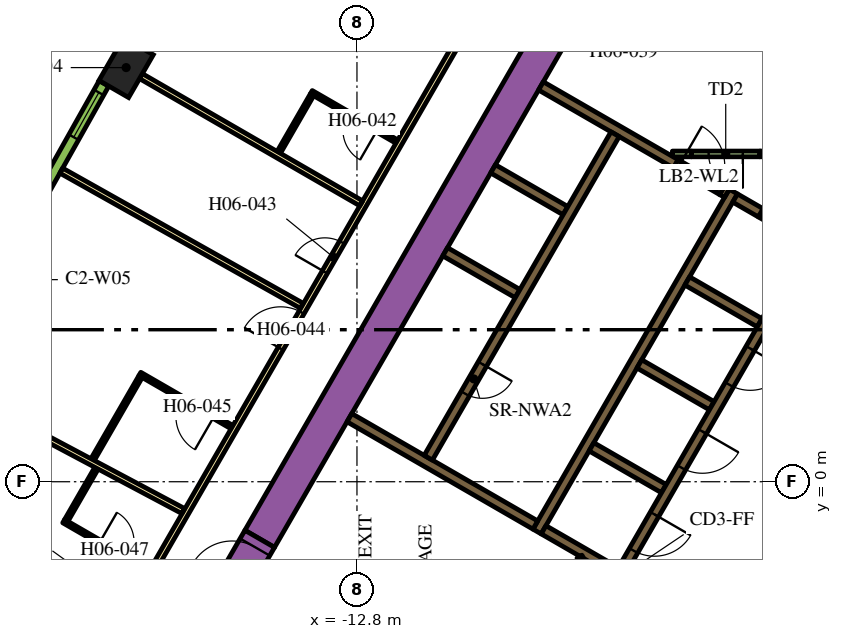
"""IFC4 building model, lengths in metres.
Left out: names, types, materials, properties, quantities, classifications, styles, units other than length and angle.
Written with IfcOpenShell. Run it as: python <this file> out.ifc"""

import sys

from ifc_helpers import new_model, si_unit, direction, frame, frame_2d, origin, origin_2d, place, context, subcontext, project, spatial, polyline, rectangle, outline, extrude, element, fill, save


model = new_model("IFC4")
c1 = context("Model", 3, precision=1e-05, world=origin(), true_north=direction((0.0, 1.0)))
c2 = subcontext(c1, "Body", "Model", "MODEL_VIEW")
j1 = project(units=[si_unit("LENGTHUNIT", "METRE"), si_unit("PLANEANGLEUNIT", "RADIAN")], contexts=[c1])
p1 = place(None, origin())
s1 = spatial("IfcSite", under=j1, at=p1, CompositionType="ELEMENT")
p2 = place(p1, origin())
s2 = spatial("IfcBuilding", under=s1, at=p2, CompositionType="ELEMENT")
p3 = place(p2, frame((0.0, 0.0, 87.6)))
s3 = spatial("IfcBuildingStorey", under=s2, at=p3, CompositionType="ELEMENT", Elevation=87.6)
p4 = place(p3, frame((-18.874, 10.897, 0.0), z_axis=(0.0, 0.0, 1.0), x_axis=(-0.5, -0.866025403784, 0.0)))
e1 = element("IfcColumn", 1, at=p4, inside=s3, PredefinedType="COLUMN", context=c2, shape_type="SweptSolid", body=[
    extrude(rectangle(XDim=1.3, YDim=0.9, at=origin_2d()), origin(), (0.0, 0.0, 1.0), 3.9),
])
p5 = place(p3, frame((-15.36, -1.503, 0.0), z_axis=(0.0, 0.0, 1.0), x_axis=(0.50000389221, 0.866023156604, 0.0)))
e2 = element("IfcWall", 2, at=p5, inside=s3, PredefinedType="SOLIDWALL", context=c2, shape_type="SweptSolid", body=[
    extrude(rectangle(XDim=21.0, YDim=0.9, at=frame_2d((10.5, 0.0))), origin(), (0.0, 0.0, 1.0), 3.9),
])
p6 = place(p3, frame((-8.06, -1.311, 0.0), z_axis=(0.0, 0.0, 1.0), x_axis=(0.50000273126, 0.866023826885, 0.0)))
e3 = element("IfcWall", 3, at=p6, inside=s3, PredefinedType="SOLIDWALL", context=c2, shape_type="SweptSolid", body=[
    extrude(rectangle(XDim=10.33, YDim=0.25, at=frame_2d((5.165, 0.0))), origin(), (0.0, 0.0, 1.0), 3.9),
])
p7 = place(p3, frame((-1.819, 6.87, 0.0), z_axis=(0.0, 0.0, 1.0), x_axis=(-0.866294599386, 0.499533449405, 0.0)))
e4 = element("IfcWall", 4, at=p7, inside=s3, PredefinedType="SOLIDWALL", context=c2, shape_type="SweptSolid", body=[
    extrude(rectangle(XDim=0.41, YDim=0.25, at=frame_2d((0.205, 0.0))), origin(), (0.0, 0.0, 1.0), 3.9),
])
p8 = place(p3, frame((-2.849, 7.465, 0.0), z_axis=(0.0, 0.0, 1.0), x_axis=(0.865955664968, -0.500120771724, 0.0)))
e5 = element("IfcWall", 5, at=p8, inside=s3, PredefinedType="SOLIDWALL", context=c2, shape_type="SweptSolid", body=[
    extrude(rectangle(XDim=0.778, YDim=0.25, at=frame_2d((0.389, 0.0))), origin(), (0.0, 0.0, 1.0), 3.9),
])
for number, where, z_axis, x_axis in (
    (6, (-2.204, 4.182, 0.0), (0.0, 0.0, 1.0), (-0.866, 0.5, 0.0)),
    (7, (-5.369, 3.1, 0.0), (0.0, 0.0, 1.0), (0.866, -0.5, 0.0)),
    (8, (-4.724, -0.182, 0.0), (0.0, 0.0, 1.0), (-0.866, 0.5, 0.0)),
):
    element("IfcWall", number, at=place(p3, frame(where, z_axis=z_axis, x_axis=x_axis)), inside=s3, PredefinedType="SOLIDWALL", context=c2, shape_type="SweptSolid", body=[
        extrude(rectangle(XDim=2.2, YDim=0.25, at=frame_2d((1.1, 0.0))), origin(), (0.0, 0.0, 1.0), 3.9),
    ])
p9 = place(p3, origin())
e9 = element("IfcWall", 9, at=p9, inside=s3, PredefinedType="SOLIDWALL", context=c2, shape_type="SweptSolid", body=[
    extrude(outline(polyline([(-5.922, -2.257), (-5.922, -2.257), (-5.705, -2.382), (-5.83, -2.598), (-6.829, -2.021), (-6.88, -1.934), (-6.88, -1.934), (-6.93, -1.963), (-7.952, -1.373), (-7.827, -1.156), (-5.922, -2.257)])), origin(), (0.0, 0.0, 1.0), 3.9),
])
p10 = place(p3, frame((-8.106, -1.14, 0.0), z_axis=(0.0, 0.0, 1.0), x_axis=(-0.866000643155, 0.500042884217, 0.0)))
e10 = element("IfcWall", 10, at=p10, inside=s3, PredefinedType="SOLIDWALL", context=c2, shape_type="SweptSolid", body=[
    extrude(rectangle(XDim=5.65, YDim=0.25, at=frame_2d((2.825, 0.0))), origin(), (0.0, 0.0, 1.0), 3.9),
])
e11 = element("IfcWall", 11, at=p9, inside=s3, PredefinedType="SOLIDWALL", context=c2, shape_type="SweptSolid", body=[
    extrude(outline(polyline([(-3.128, 7.481), (-3.259, 7.557), (-3.134, 7.773), (-3.003, 7.698), (-3.128, 7.481)])), origin(), (0.0, 0.0, 1.0), 3.9),
])
for number, where, z_axis, x_axis in (
    (12, (-8.574, 4.95, 0.0), (0.0, 0.0, 1.0), (-0.866, 0.5, 0.0)),
    (13, (-7.314, 7.132, 0.0), (0.0, 0.0, 1.0), (-0.866, 0.5, 0.0)),
):
    element("IfcWall", number, at=place(p3, frame(where, z_axis=z_axis, x_axis=x_axis)), inside=s3, PredefinedType="SOLIDWALL", context=c2, shape_type="SweptSolid", body=[
        extrude(rectangle(XDim=2.2, YDim=0.25, at=frame_2d((1.1, 0.0))), origin(), (0.0, 0.0, 1.0), 3.9),
    ])
p11 = place(p3, frame((-7.959, 10.415, 0.0), z_axis=(0.0, 0.0, 1.0), x_axis=(0.866020958405, -0.500007699544, 0.0)))
e14 = element("IfcWall", 14, at=p11, inside=s3, PredefinedType="SOLIDWALL", context=c2, shape_type="SweptSolid", body=[
    extrude(rectangle(XDim=4.1, YDim=0.25, at=frame_2d((2.05, 0.0))), origin(), (0.0, 0.0, 1.0), 3.9),
])
p12 = place(p3, frame((-3.997, 8.625, 0.0), z_axis=(0.0, 0.0, 1.0), x_axis=(-1.0, 0.0, 0.0)))
e15 = element("IfcWall", 15, at=p12, inside=s3, PredefinedType="PARTITIONING", context=c2, shape_type="SweptSolid", body=[
    extrude(rectangle(XDim=0.502, YDim=0.15, at=frame_2d((0.251, 0.0))), origin(), (0.0, 0.0, 1.0), 2.75),
])
p13 = place(p3, frame((-2.196, 8.625, 0.0), z_axis=(0.0, 0.0, 1.0), x_axis=(1.0, 0.0, 0.0)))
e16 = element("IfcWall", 16, at=p13, inside=s3, PredefinedType="PARTITIONING", context=c2, shape_type="SweptSolid", body=[
    extrude(rectangle(XDim=1.146, YDim=0.15, at=frame_2d((0.573, 0.0))), origin(), (0.0, 0.0, 1.0), 2.75),
])
p14 = place(p3, frame((-6.008, 9.144, 0.0), z_axis=(0.0, 0.0, 1.0), x_axis=(-0.500006956611, -0.866021387346, 0.0)))
e17 = element("IfcWall", 17, at=p14, inside=s3, PredefinedType="SOLIDWALL", context=c2, shape_type="SweptSolid", body=[
    extrude(rectangle(XDim=9.83, YDim=0.25, at=frame_2d((4.915, 0.0))), origin(), (0.0, 0.0, 1.0), 3.9),
])
p15 = place(p14, frame((6.985, 0.0, 0.0)))
e18 = element("IfcOpeningElement", 18, at=p15, cuts=e17, PredefinedType="OPENING", context=c2, shape_type="SweptSolid", body=[
    extrude(rectangle(XDim=0.9, YDim=2.1, at=frame_2d((0.45, 1.05))), frame((0.0, 0.135, 0.0), z_axis=(0.0, -1.0, 0.0), x_axis=(1.0, 0.0, 0.0)), (0.0, 0.0, 1.0), 0.27),
])
p16 = place(p3, frame((-0.898, 6.194, 0.0), z_axis=(0.0, 0.0, 1.0), x_axis=(-0.499996202215, -0.866027596426, 0.0)))
e19 = element("IfcWall", 19, at=p16, inside=s3, PredefinedType="SOLIDWALL", context=c2, shape_type="SweptSolid", body=[
    extrude(rectangle(XDim=9.83, YDim=0.25, at=frame_2d((4.915, 0.0))), origin(), (0.0, 0.0, 1.0), 3.9),
])
p17 = place(p16, frame((0.585, 0.0, 0.0)))
e20 = element("IfcOpeningElement", 20, at=p17, cuts=e19, PredefinedType="OPENING", context=c2, shape_type="SweptSolid", body=[
    extrude(rectangle(XDim=1.1, YDim=2.1, at=frame_2d((0.55, 1.05))), frame((0.0, 0.135, 0.0), z_axis=(0.0, -1.0, 0.0), x_axis=(1.0, 0.0, 0.0)), (0.0, 0.0, 1.0), 0.27),
])
p18 = place(p16, frame((3.105, 0.0, 0.0)))
e21 = element("IfcOpeningElement", 21, at=p18, cuts=e19, PredefinedType="OPENING", context=c2, shape_type="SweptSolid", body=[
    extrude(rectangle(XDim=1.1, YDim=2.1, at=frame_2d((0.55, 1.05))), frame((0.0, 0.135, 0.0), z_axis=(0.0, -1.0, 0.0), x_axis=(1.0, 0.0, 0.0)), (0.0, 0.0, 1.0), 0.27),
])
p19 = place(p16, frame((5.625, 0.0, 0.0)))
e22 = element("IfcOpeningElement", 22, at=p19, cuts=e19, PredefinedType="OPENING", context=c2, shape_type="SweptSolid", body=[
    extrude(rectangle(XDim=1.1, YDim=2.1, at=frame_2d((0.55, 1.05))), frame((0.0, 0.135, 0.0), z_axis=(0.0, -1.0, 0.0), x_axis=(1.0, 0.0, 0.0)), (0.0, 0.0, 1.0), 0.27),
])
p20 = place(p16, frame((8.145, 0.0, 0.0)))
e23 = element("IfcOpeningElement", 23, at=p20, cuts=e19, PredefinedType="OPENING", context=c2, shape_type="SweptSolid", body=[
    extrude(rectangle(XDim=1.1, YDim=2.1, at=frame_2d((0.55, 1.05))), frame((0.0, 0.135, 0.0), z_axis=(0.0, -1.0, 0.0), x_axis=(1.0, 0.0, 0.0)), (0.0, 0.0, 1.0), 0.27),
])
p21 = place(p3, frame((-2.196, 8.625, 0.0), z_axis=(0.0, 0.0, 1.0), x_axis=(-1.0, 0.0, 0.0)))
e24 = element("IfcWall", 24, at=p21, inside=s3, PredefinedType="PARTITIONING", context=c2, shape_type="SweptSolid", body=[
    extrude(rectangle(XDim=1.8, YDim=0.15, at=frame_2d((0.9, 0.0))), origin(), (0.0, 0.0, 1.0), 2.75),
])
p22 = place(p21, frame((0.45, 0.0, 0.0)))
e25 = element("IfcOpeningElement", 25, at=p22, cuts=e24, PredefinedType="OPENING", context=c2, shape_type="SweptSolid", body=[
    extrude(rectangle(XDim=0.9, YDim=2.1, at=frame_2d((0.45, 1.05))), frame((0.0, 0.085, 0.0), z_axis=(0.0, -1.0, 0.0), x_axis=(1.0, 0.0, 0.0)), (0.0, 0.0, 1.0), 0.17),
])
p23 = place(p3, frame((-5.895, -3.79, 0.0), z_axis=(0.0, 0.0, 1.0), x_axis=(-0.49994051562, 0.866059744384, 0.0)))
e26 = element("IfcWall", 26, at=p23, inside=s3, PredefinedType="PARTITIONING", context=c2, shape_type="SweptSolid", body=[
    extrude(rectangle(XDim=2.1, YDim=0.15, at=frame_2d((1.05, 0.0))), origin(), (0.0, 0.0, 1.0), 2.75),
])
p24 = place(p23, frame((0.45, 0.0, 0.0)))
e27 = element("IfcOpeningElement", 27, at=p24, cuts=e26, PredefinedType="OPENING", context=c2, shape_type="SweptSolid", body=[
    extrude(rectangle(XDim=1.2, YDim=2.1, at=frame_2d((0.6, 1.05))), frame((0.0, 0.085, 0.0), z_axis=(0.0, -1.0, 0.0), x_axis=(1.0, 0.0, 0.0)), (0.0, 0.0, 1.0), 0.17),
])
p25 = place(p3, frame((-4.409, 8.365, 0.0), z_axis=(0.0, 0.0, 1.0), x_axis=(0.866034573852, -0.49998411664, 0.0)))
e28 = element("IfcWall", 28, at=p25, inside=s3, PredefinedType="SOLIDWALL", context=c2, shape_type="SweptSolid", body=[
    extrude(rectangle(XDim=1.4, YDim=0.25, at=frame_2d((0.7, 0.0))), origin(), (0.0, 0.0, 1.0), 3.9),
])
p26 = place(p25, frame((0.1, 0.0, 0.0)))
e29 = element("IfcOpeningElement", 29, at=p26, cuts=e28, PredefinedType="OPENING", context=c2, shape_type="SweptSolid", body=[
    extrude(rectangle(XDim=1.2, YDim=2.1, at=frame_2d((0.6, 1.05))), frame((0.0, 0.135, 0.0), z_axis=(0.0, -1.0, 0.0), x_axis=(1.0, 0.0, 0.0)), (0.0, 0.0, 1.0), 0.27),
])
p27 = place(p3, frame((-16.209, -2.976, 0.0), z_axis=(0.0, 0.0, 1.0), x_axis=(0.499954529098, 0.86605165483, 0.0)))
e30 = element("IfcWall", 30, at=p27, inside=s3, PredefinedType="SOLIDWALL", context=c2, shape_type="SweptSolid", body=[
    extrude(rectangle(XDim=1.7, YDim=0.9, at=frame_2d((0.85, 0.0))), origin(), (0.0, 0.0, 1.0), 3.9),
])
p28 = place(p27, frame((0.25, 0.0, 0.0)))
e31 = element("IfcOpeningElement", 31, at=p28, cuts=e30, PredefinedType="OPENING", context=c2, shape_type="SweptSolid", body=[
    extrude(rectangle(XDim=1.2, YDim=2.1, at=frame_2d((0.6, 1.05))), frame((0.0, 0.46, 0.0), z_axis=(0.0, -1.0, 0.0), x_axis=(1.0, 0.0, 0.0)), (0.0, 0.0, 1.0), 0.92),
])
p29 = place(p3, frame((-19.081, -3.9, 0.0), z_axis=(0.0, 0.0, 1.0), x_axis=(0.499998313975, 0.866026377209, 0.0)))
e32 = element("IfcWall", 32, at=p29, inside=s3, PredefinedType="PARTITIONING", context=c2, shape_type="SweptSolid", body=[
    extrude(rectangle(XDim=25.766, YDim=0.15, at=frame_2d((12.883, 0.0))), origin(), (0.0, 0.0, 1.0), 2.75),
])
p30 = place(p29, frame((19.306, 0.0, 0.0)))
e33 = element("IfcOpeningElement", 33, at=p30, cuts=e32, PredefinedType="OPENING", context=c2, shape_type="SweptSolid", body=[
    extrude(rectangle(XDim=1.0, YDim=2.1, at=frame_2d((0.5, 1.05))), frame((0.0, 0.085, 0.0), z_axis=(0.0, -1.0, 0.0), x_axis=(1.0, 0.0, 0.0)), (0.0, 0.0, 1.0), 0.17),
])
p31 = place(p29, frame((18.0, 0.0, 0.0)))
e34 = element("IfcOpeningElement", 34, at=p31, cuts=e32, PredefinedType="OPENING", context=c2, shape_type="SweptSolid", body=[
    extrude(rectangle(XDim=1.0, YDim=2.1, at=frame_2d((0.5, 1.05))), frame((0.0, 0.085, 0.0), z_axis=(0.0, -1.0, 0.0), x_axis=(1.0, 0.0, 0.0)), (0.0, 0.0, 1.0), 0.17),
])
p32 = place(p29, frame((10.874, 0.0, 0.0)))
e35 = element("IfcOpeningElement", 35, at=p32, cuts=e32, PredefinedType="OPENING", context=c2, shape_type="SweptSolid", body=[
    extrude(rectangle(XDim=0.9, YDim=2.1, at=frame_2d((0.45, 1.05))), frame((0.0, 0.085, 0.0), z_axis=(0.0, -1.0, 0.0), x_axis=(1.0, 0.0, 0.0)), (0.0, 0.0, 1.0), 0.17),
])
p33 = place(p29, frame((8.548, 0.0, 0.0)))
e36 = element("IfcOpeningElement", 36, at=p33, cuts=e32, PredefinedType="OPENING", context=c2, shape_type="SweptSolid", body=[
    extrude(rectangle(XDim=1.1, YDim=2.1, at=frame_2d((0.55, 1.05))), frame((0.0, 0.085, 0.0), z_axis=(0.0, -1.0, 0.0), x_axis=(1.0, 0.0, 0.0)), (0.0, 0.0, 1.0), 0.17),
])
p34 = place(p29, frame((0.18, 0.0, 0.0)))
e37 = element("IfcOpeningElement", 37, at=p34, cuts=e32, PredefinedType="OPENING", context=c2, shape_type="SweptSolid", body=[
    extrude(rectangle(XDim=1.0, YDim=2.1, at=frame_2d((0.5, 1.05))), frame((0.0, 0.085, 0.0), z_axis=(0.0, -1.0, 0.0), x_axis=(1.0, 0.0, 0.0)), (0.0, 0.0, 1.0), 0.17),
])
p35 = place(p3, frame((-23.652, 2.567, 0.0), z_axis=(0.0, 0.0, 1.0), x_axis=(0.883019237957, -0.469336793144, 0.0)))
e38 = element("IfcWall", 38, at=p35, inside=s3, PredefinedType="PARTITIONING", context=c2, shape_type="SweptSolid", body=[
    extrude(rectangle(XDim=7.111, YDim=0.15, at=frame_2d((3.555, 0.0))), origin(), (0.0, 0.0, 1.0), 2.75),
])
p36 = place(p3, frame((-20.581, 8.185, 0.0), z_axis=(0.0, 0.0, 1.0), x_axis=(0.871820720803, -0.489825102233, 0.0)))
e39 = element("IfcWall", 39, at=p36, inside=s3, PredefinedType="PARTITIONING", context=c2, shape_type="SweptSolid", body=[
    extrude(rectangle(XDim=7.257, YDim=0.15, at=frame_2d((3.628, 0.0))), origin(), (0.0, 0.0, 1.0), 2.75),
])
p37 = place(p3, frame((-18.484, 10.672, 0.0), z_axis=(0.0, 0.0, 1.0), x_axis=(0.866019162053, -0.50001081084, 0.0)))
e40 = element("IfcWall", 40, at=p37, inside=s3, PredefinedType="PARTITIONING", context=c2, shape_type="SweptSolid", body=[
    extrude(rectangle(XDim=6.694, YDim=0.15, at=frame_2d((3.347, 0.0))), origin(), (0.0, 0.0, 1.0), 2.75),
])
p38 = place(p3, frame((-11.75, 8.949, 0.0), z_axis=(0.0, 0.0, 1.0), x_axis=(-0.865997922154, 0.500047596559, 0.0)))
e41 = element("IfcWall", 41, at=p38, inside=s3, PredefinedType="PARTITIONING", context=c2, shape_type="SweptSolid", body=[
    extrude(rectangle(XDim=2.6, YDim=0.1, at=frame_2d((1.3, 0.0))), origin(), (0.0, 0.0, 1.0), 2.75),
])
p39 = place(p38, frame((0.6, 0.0, 0.0)))
e42 = element("IfcOpeningElement", 42, at=p39, cuts=e41, PredefinedType="OPENING", context=c2, shape_type="SweptSolid", body=[
    extrude(rectangle(XDim=0.9, YDim=2.1, at=frame_2d((0.45, 1.05))), frame((0.0, 0.06, 0.0), z_axis=(0.0, -1.0, 0.0), x_axis=(1.0, 0.0, 0.0)), (0.0, 0.0, 1.0), 0.12),
])
p40 = place(p3, frame((-13.983, 10.181, 0.0), z_axis=(0.0, 0.0, 1.0), x_axis=(-0.499980071345, -0.866036909293, 0.0)))
e43 = element("IfcWall", 43, at=p40, inside=s3, PredefinedType="PARTITIONING", context=c2, shape_type="SweptSolid", body=[
    extrude(rectangle(XDim=1.75, YDim=0.1, at=frame_2d((0.875, 0.0))), origin(), (0.0, 0.0, 1.0), 2.75),
])
p41 = place(p3, frame((-16.087, 1.436, 0.0), z_axis=(0.0, 0.0, 1.0), x_axis=(-0.866034573852, 0.49998411664, 0.0)))
e44 = element("IfcWall", 44, at=p41, inside=s3, PredefinedType="PARTITIONING", context=c2, shape_type="SweptSolid", body=[
    extrude(rectangle(XDim=2.8, YDim=0.1, at=frame_2d((1.4, 0.0))), origin(), (0.0, 0.0, 1.0), 2.75),
])
p42 = place(p41, frame((0.55, 0.0, 0.0)))
e45 = element("IfcOpeningElement", 45, at=p42, cuts=e44, PredefinedType="OPENING", context=c2, shape_type="SweptSolid", body=[
    extrude(rectangle(XDim=1.0, YDim=2.1, at=frame_2d((0.5, 1.05))), frame((0.0, 0.06, 0.0), z_axis=(0.0, -1.0, 0.0), x_axis=(1.0, 0.0, 0.0)), (0.0, 0.0, 1.0), 0.12),
])
p43 = place(p3, frame((-18.494, 2.768, 0.0), z_axis=(0.0, 0.0, 1.0), x_axis=(-0.500004791531, -0.866022637375, 0.0)))
e46 = element("IfcWall", 46, at=p43, inside=s3, PredefinedType="PARTITIONING", context=c2, shape_type="SweptSolid", body=[
    extrude(rectangle(XDim=2.52, YDim=0.1, at=frame_2d((1.26, 0.0))), origin(), (0.0, 0.0, 1.0), 2.75),
])
p44 = place(p3, frame((-20.518, -1.037, 0.0), z_axis=(0.0, 0.0, 1.0), x_axis=(0.866021400173, -0.500006934395, 0.0)))
e47 = element("IfcWall", 47, at=p44, inside=s3, PredefinedType="PARTITIONING", context=c2, shape_type="SweptSolid", body=[
    extrude(rectangle(XDim=2.6, YDim=0.1, at=frame_2d((1.3, 0.0))), origin(), (0.0, 0.0, 1.0), 2.75),
])
p45 = place(p44, frame((1.1, 0.0, 0.0)))
e48 = element("IfcOpeningElement", 48, at=p45, cuts=e47, PredefinedType="OPENING", context=c2, shape_type="SweptSolid", body=[
    extrude(rectangle(XDim=0.9, YDim=2.1, at=frame_2d((0.45, 1.05))), frame((0.0, 0.06, 0.0), z_axis=(0.0, -1.0, 0.0), x_axis=(1.0, 0.0, 0.0)), (0.0, 0.0, 1.0), 0.12),
])
p46 = place(p3, frame((-20.449, -1.019, 0.0), z_axis=(0.0, 0.0, 1.0), x_axis=(0.500061319399, 0.865989998118, 0.0)))
e49 = element("IfcWall", 49, at=p46, inside=s3, PredefinedType="PARTITIONING", context=c2, shape_type="SweptSolid", body=[
    extrude(rectangle(XDim=1.58, YDim=0.1, at=frame_2d((0.79, 0.0))), origin(), (0.0, 0.0, 1.0), 2.75),
])
p47 = place(p3, frame((-19.458, 10.48, 0.0), z_axis=(0.0, 0.0, 1.0), x_axis=(-0.48983164787, -0.87181704316, 0.0)))
e50 = element("IfcWall", 50, at=p47, inside=s3, PredefinedType="SOLIDWALL", context=c2, shape_type="SweptSolid", body=[
    extrude(rectangle(XDim=5.1, YDim=0.29, at=frame_2d((2.55, 0.0))), origin(), (0.0, 0.0, 1.0), 3.65),
])
p48 = place(p47, frame((0.272, 0.0, 0.9)))
e51 = element("IfcOpeningElement", 51, at=p48, cuts=e50, PredefinedType="OPENING", context=c2, shape_type="SweptSolid", body=[
    extrude(rectangle(XDim=1.35, YDim=2.15, at=frame_2d((0.675, 1.075))), frame((0.0, 0.155, 0.0), z_axis=(0.0, -1.0, 0.0), x_axis=(1.0, 0.0, 0.0)), (0.0, 0.0, 1.0), 0.31),
])
p49 = place(p47, frame((3.478, 0.0, 0.9)))
e52 = element("IfcOpeningElement", 52, at=p49, cuts=e50, PredefinedType="OPENING", context=c2, shape_type="SweptSolid", body=[
    extrude(rectangle(XDim=1.35, YDim=2.15, at=frame_2d((0.675, 1.075))), frame((0.0, 0.155, 0.0), z_axis=(0.0, -1.0, 0.0), x_axis=(1.0, 0.0, 0.0)), (0.0, 0.0, 1.0), 0.31),
])
p50 = place(p15, origin())
e53 = element("IfcDoor", 53, at=p50, inside=s3, OperationType="SINGLE_SWING_LEFT", PredefinedType="DOOR", context=c2, shape_type="SweptSolid", body=[
    extrude(rectangle(XDim=0.9, YDim=2.1, at=frame_2d((0.45, 1.05))), frame((0.0, 0.025, 0.0), z_axis=(0.0, -1.0, 0.0), x_axis=(1.0, 0.0, 0.0)), (0.0, 0.0, 1.0), 0.05),
])
fill(e18, e53)
p51 = place(p18, origin())
e54 = element("IfcDoor", 54, at=p51, inside=s3, OperationType="DOUBLE_DOOR_SLIDING", PredefinedType="DOOR", context=c2, shape_type="SweptSolid", body=[
    extrude(rectangle(XDim=1.1, YDim=2.1, at=frame_2d((0.55, 1.05))), frame((0.0, 0.025, 0.0), z_axis=(0.0, -1.0, 0.0), x_axis=(1.0, 0.0, 0.0)), (0.0, 0.0, 1.0), 0.05),
])
fill(e21, e54)
p52 = place(p19, origin())
e55 = element("IfcDoor", 55, at=p52, inside=s3, OperationType="DOUBLE_DOOR_SLIDING", PredefinedType="DOOR", context=c2, shape_type="SweptSolid", body=[
    extrude(rectangle(XDim=1.1, YDim=2.1, at=frame_2d((0.55, 1.05))), frame((0.0, 0.025, 0.0), z_axis=(0.0, -1.0, 0.0), x_axis=(1.0, 0.0, 0.0)), (0.0, 0.0, 1.0), 0.05),
])
fill(e22, e55)
p53 = place(p20, origin())
e56 = element("IfcDoor", 56, at=p53, inside=s3, OperationType="DOUBLE_DOOR_SLIDING", PredefinedType="DOOR", context=c2, shape_type="SweptSolid", body=[
    extrude(rectangle(XDim=1.1, YDim=2.1, at=frame_2d((0.55, 1.05))), frame((0.0, 0.025, 0.0), z_axis=(0.0, -1.0, 0.0), x_axis=(1.0, 0.0, 0.0)), (0.0, 0.0, 1.0), 0.05),
])
fill(e23, e56)
p54 = place(p22, origin())
e57 = element("IfcDoor", 57, at=p54, inside=s3, OperationType="SINGLE_SWING_LEFT", PredefinedType="DOOR", context=c2, shape_type="SweptSolid", body=[
    extrude(rectangle(XDim=0.9, YDim=2.1, at=frame_2d((0.45, 1.05))), frame((0.0, 0.025, 0.0), z_axis=(0.0, -1.0, 0.0), x_axis=(1.0, 0.0, 0.0)), (0.0, 0.0, 1.0), 0.05),
])
fill(e25, e57)
p55 = place(p26, origin())
e58 = element("IfcDoor", 58, at=p55, inside=s3, OperationType="SINGLE_SWING_LEFT", PredefinedType="DOOR", context=c2, shape_type="SweptSolid", body=[
    extrude(rectangle(XDim=1.2, YDim=2.1, at=frame_2d((0.6, 1.05))), frame((0.0, 0.025, 0.0), z_axis=(0.0, -1.0, 0.0), x_axis=(1.0, 0.0, 0.0)), (0.0, 0.0, 1.0), 0.05),
])
fill(e29, e58)
p56 = place(p28, origin())
e59 = element("IfcDoor", 59, at=p56, inside=s3, OperationType="SINGLE_SWING_LEFT", PredefinedType="DOOR", context=c2, shape_type="SweptSolid", body=[
    extrude(rectangle(XDim=1.2, YDim=2.1, at=frame_2d((0.6, 1.05))), frame((0.0, 0.025, 0.0), z_axis=(0.0, -1.0, 0.0), x_axis=(1.0, 0.0, 0.0)), (0.0, 0.0, 1.0), 0.05),
])
fill(e31, e59)
p57 = place(p39, origin())
e60 = element("IfcDoor", 60, at=p57, inside=s3, OperationType="SINGLE_SWING_LEFT", PredefinedType="DOOR", context=c2, shape_type="SweptSolid", body=[
    extrude(rectangle(XDim=0.9, YDim=2.1, at=frame_2d((0.45, 1.05))), frame((0.0, 0.025, 0.0), z_axis=(0.0, -1.0, 0.0), x_axis=(1.0, 0.0, 0.0)), (0.0, 0.0, 1.0), 0.05),
])
fill(e42, e60)
p58 = place(p32, origin())
e61 = element("IfcDoor", 61, at=p58, inside=s3, OperationType="SINGLE_SWING_LEFT", PredefinedType="DOOR", context=c2, shape_type="SweptSolid", body=[
    extrude(rectangle(XDim=0.9, YDim=2.1, at=frame_2d((0.45, 1.05))), frame((0.0, 0.025, 0.0), z_axis=(0.0, -1.0, 0.0), x_axis=(1.0, 0.0, 0.0)), (0.0, 0.0, 1.0), 0.05),
])
fill(e35, e61)
p59 = place(p33, origin())
e62 = element("IfcDoor", 62, at=p59, inside=s3, OperationType="SINGLE_SWING_RIGHT", PredefinedType="DOOR", context=c2, shape_type="SweptSolid", body=[
    extrude(rectangle(XDim=1.1, YDim=2.1, at=frame_2d((0.55, 1.05))), frame((0.0, 0.025, 0.0), z_axis=(0.0, -1.0, 0.0), x_axis=(1.0, 0.0, 0.0)), (0.0, 0.0, 1.0), 0.05),
])
fill(e36, e62)
p60 = place(p42, origin())
e63 = element("IfcDoor", 63, at=p60, inside=s3, OperationType="SINGLE_SWING_RIGHT", PredefinedType="DOOR", context=c2, shape_type="SweptSolid", body=[
    extrude(rectangle(XDim=1.0, YDim=2.1, at=frame_2d((0.5, 1.05))), frame((0.0, 0.025, 0.0), z_axis=(0.0, -1.0, 0.0), x_axis=(1.0, 0.0, 0.0)), (0.0, 0.0, 1.0), 0.05),
])
fill(e45, e63)
p61 = place(p45, origin())
e64 = element("IfcDoor", 64, at=p61, inside=s3, OperationType="SINGLE_SWING_LEFT", PredefinedType="DOOR", context=c2, shape_type="SweptSolid", body=[
    extrude(rectangle(XDim=0.9, YDim=2.1, at=frame_2d((0.45, 1.05))), frame((0.0, 0.025, 0.0), z_axis=(0.0, -1.0, 0.0), x_axis=(1.0, 0.0, 0.0)), (0.0, 0.0, 1.0), 0.05),
])
fill(e48, e64)
p62 = place(p48, origin())
e65 = element("IfcWindow", 65, at=p62, inside=s3, PartitioningType="DOUBLE_PANEL_VERTICAL", PredefinedType="WINDOW", context=c2, shape_type="SweptSolid", body=[
    extrude(rectangle(XDim=1.35, YDim=2.15, at=frame_2d((0.675, 1.075))), frame((0.0, 0.015, 0.0), z_axis=(0.0, -1.0, 0.0), x_axis=(1.0, 0.0, 0.0)), (0.0, 0.0, 1.0), 0.06),
])
fill(e51, e65)
save(model, sys.argv[1])
